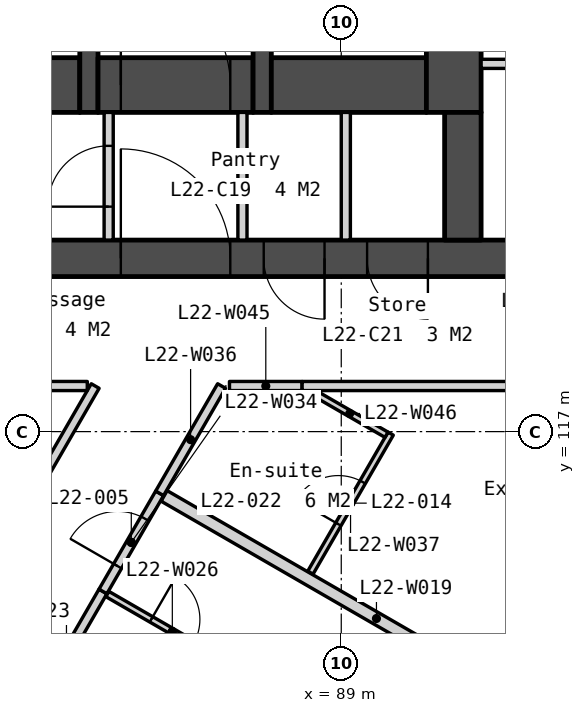
"""IFC4 building model, lengths in metres.
Left out: names, types, materials, properties, quantities, classifications, styles, units other than length and angle.
Written with IfcOpenShell. Run it as: python <this file> out.ifc"""

import sys

from ifc_helpers import new_model, si_unit, direction, frame, frame_2d, origin, place, context, subcontext, project, spatial, polyline, rectangle, outline, extrude, element, fill, save


model = new_model("IFC4")
c1 = context("Model", 3, precision=1e-05, world=origin(), true_north=direction((0.0, 1.0)))
c2 = subcontext(c1, "Body", "Model", "MODEL_VIEW")
j1 = project(units=[si_unit("LENGTHUNIT", "METRE"), si_unit("PLANEANGLEUNIT", "RADIAN")], contexts=[c1])
p1 = place(None, origin())
s1 = spatial("IfcSite", under=j1, at=p1, CompositionType="ELEMENT")
p2 = place(p1, origin())
s2 = spatial("IfcBuilding", under=s1, at=p2, CompositionType="ELEMENT")
p3 = place(p2, frame((0.0, 0.0, 92.3)))
s3 = spatial("IfcBuildingStorey", under=s2, at=p3, CompositionType="ELEMENT", Elevation=92.3)
p4 = place(p3, frame((66.0, 119.85, 0.0), z_axis=(0.0, 0.0, 1.0), x_axis=(1.0, 0.0, 0.0)))
e1 = element("IfcWall", 1, at=p4, inside=s3, PredefinedType="SOLIDWALL", context=c2, shape_type="SweptSolid", body=[
    extrude(rectangle(XDim=28.0, YDim=0.6, at=frame_2d((14.0, 0.0))), origin(), (0.0, 0.0, 1.0), 3.35),
])
p5 = place(p4, frame((6.825, 0.0, 0.0)))
e2 = element("IfcOpeningElement", 2, at=p5, cuts=e1, PredefinedType="OPENING", context=c2, shape_type="SweptSolid", body=[
    extrude(rectangle(XDim=1.8, YDim=2.1, at=frame_2d((0.9, 1.05))), frame((0.0, 0.31, 0.0), z_axis=(0.0, -1.0, 0.0), x_axis=(1.0, 0.0, 0.0)), (0.0, 0.0, 1.0), 0.62),
])
p6 = place(p4, frame((15.85, 0.0, 0.0)))
e3 = element("IfcOpeningElement", 3, at=p6, cuts=e1, PredefinedType="OPENING", context=c2, shape_type="SweptSolid", body=[
    extrude(rectangle(XDim=1.5, YDim=2.1, at=frame_2d((0.75, 1.05))), frame((0.0, 0.31, 0.0), z_axis=(0.0, -1.0, 0.0), x_axis=(1.0, 0.0, 0.0)), (0.0, 0.0, 1.0), 0.62),
])
p7 = place(p4, frame((19.375, 0.0, 0.0)))
e4 = element("IfcOpeningElement", 4, at=p7, cuts=e1, PredefinedType="OPENING", context=c2, shape_type="SweptSolid", body=[
    extrude(rectangle(XDim=1.8, YDim=2.1, at=frame_2d((0.9, 1.05))), frame((0.0, 0.31, 0.0), z_axis=(0.0, -1.0, 0.0), x_axis=(1.0, 0.0, 0.0)), (0.0, 0.0, 1.0), 0.62),
])
p8 = place(p4, frame((4.425, 0.0, 0.0)))
e5 = element("IfcOpeningElement", 5, at=p8, cuts=e1, PredefinedType="OPENING", context=c2, shape_type="SweptSolid", body=[
    extrude(rectangle(XDim=1.0, YDim=2.1, at=frame_2d((0.5, 1.05))), frame((0.0, 0.31, 0.0), z_axis=(0.0, -1.0, 0.0), x_axis=(1.0, 0.0, 0.0)), (0.0, 0.0, 1.0), 0.62),
])
p9 = place(p4, frame((9.925, 0.0, 0.0)))
e6 = element("IfcOpeningElement", 6, at=p9, cuts=e1, PredefinedType="OPENING", context=c2, shape_type="SweptSolid", body=[
    extrude(rectangle(XDim=1.0, YDim=2.1, at=frame_2d((0.5, 1.05))), frame((0.0, 0.31, 0.0), z_axis=(0.0, -1.0, 0.0), x_axis=(1.0, 0.0, 0.0)), (0.0, 0.0, 1.0), 0.62),
])
p10 = place(p4, frame((13.125, 0.0, 0.0)))
e7 = element("IfcOpeningElement", 7, at=p10, cuts=e1, PredefinedType="OPENING", context=c2, shape_type="SweptSolid", body=[
    extrude(rectangle(XDim=1.0, YDim=2.1, at=frame_2d((0.5, 1.05))), frame((0.0, 0.31, 0.0), z_axis=(0.0, -1.0, 0.0), x_axis=(1.0, 0.0, 0.0)), (0.0, 0.0, 1.0), 0.62),
])
p11 = place(p4, frame((21.725, 0.0, 0.0)))
e8 = element("IfcOpeningElement", 8, at=p11, cuts=e1, PredefinedType="OPENING", context=c2, shape_type="SweptSolid", body=[
    extrude(rectangle(XDim=1.0, YDim=2.1, at=frame_2d((0.5, 1.05))), frame((0.0, 0.31, 0.0), z_axis=(0.0, -1.0, 0.0), x_axis=(1.0, 0.0, 0.0)), (0.0, 0.0, 1.0), 0.62),
])
p12 = place(p4, frame((23.425, 0.0, 0.0)))
e9 = element("IfcOpeningElement", 9, at=p12, cuts=e1, PredefinedType="OPENING", context=c2, shape_type="SweptSolid", body=[
    extrude(rectangle(XDim=1.0, YDim=2.1, at=frame_2d((0.5, 1.05))), frame((0.0, 0.31, 0.0), z_axis=(0.0, -1.0, 0.0), x_axis=(1.0, 0.0, 0.0)), (0.0, 0.0, 1.0), 0.62),
])
p13 = place(p3, frame((81.8, 122.7, 0.0), z_axis=(0.0, 0.0, 1.0), x_axis=(1.0, 0.0, 0.0)))
e10 = element("IfcWall", 10, at=p13, inside=s3, PredefinedType="SOLIDWALL", context=c2, shape_type="SweptSolid", body=[
    extrude(rectangle(XDim=2.9, YDim=0.9, at=frame_2d((1.45, 0.0))), origin(), (0.0, 0.0, 1.0), 3.35),
])
p14 = place(p13, frame((0.05, 0.0, 0.0)))
e11 = element("IfcOpeningElement", 11, at=p14, cuts=e10, PredefinedType="OPENING", context=c2, shape_type="SweptSolid", body=[
    extrude(rectangle(XDim=1.5, YDim=2.1, at=frame_2d((0.75, 1.05))), frame((0.0, 0.46, 0.0), z_axis=(0.0, -1.0, 0.0), x_axis=(1.0, 0.0, 0.0)), (0.0, 0.0, 1.0), 0.92),
])
p15 = place(p3, frame((84.85, 133.95, 0.0), z_axis=(0.0, 0.0, 1.0), x_axis=(0.0, -1.0, 0.0)))
e12 = element("IfcWall", 12, at=p15, inside=s3, PredefinedType="SOLIDWALL", context=c2, shape_type="SweptSolid", body=[
    extrude(rectangle(XDim=11.7, YDim=0.3, at=frame_2d((5.85, 0.0))), origin(), (0.0, 0.0, 1.0), 3.35),
])
p16 = place(p3, frame((85.0, 122.7, 0.0), z_axis=(0.0, 0.0, 1.0), x_axis=(1.0, 0.0, 0.0)))
e13 = element("IfcWall", 13, at=p16, inside=s3, PredefinedType="SOLIDWALL", context=c2, shape_type="SweptSolid", body=[
    extrude(rectangle(XDim=2.55, YDim=0.9, at=frame_2d((1.275, 0.0))), origin(), (0.0, 0.0, 1.0), 3.35),
])
p17 = place(p16, frame((0.375, 0.0, 0.0)))
e14 = element("IfcOpeningElement", 14, at=p17, cuts=e13, PredefinedType="OPENING", context=c2, shape_type="SweptSolid", body=[
    extrude(rectangle(XDim=1.8, YDim=2.1, at=frame_2d((0.9, 1.05))), frame((0.0, 0.46, 0.0), z_axis=(0.0, -1.0, 0.0), x_axis=(1.0, 0.0, 0.0)), (0.0, 0.0, 1.0), 0.92),
])
p18 = place(p3, frame((85.175, 122.25, 0.0), z_axis=(0.0, 0.0, 1.0), x_axis=(0.0, -1.0, 0.0)))
e15 = element("IfcWall", 15, at=p18, inside=s3, PredefinedType="PARTITIONING", context=c2, shape_type="SweptSolid", body=[
    extrude(rectangle(XDim=2.1, YDim=0.15, at=frame_2d((1.05, 0.0))), origin(), (0.0, 0.0, 1.0), 3.35),
])
p19 = place(p18, frame((0.55, 0.0, 0.0)))
e16 = element("IfcOpeningElement", 16, at=p19, cuts=e15, PredefinedType="OPENING", context=c2, shape_type="SweptSolid", body=[
    extrude(rectangle(XDim=1.0, YDim=2.1, at=frame_2d((0.5, 1.05))), frame((0.0, 0.085, 0.0), z_axis=(0.0, -1.0, 0.0), x_axis=(1.0, 0.0, 0.0)), (0.0, 0.0, 1.0), 0.17),
])
p20 = place(p3, frame((87.375, 122.25, 0.0), z_axis=(0.0, 0.0, 1.0), x_axis=(0.0, -1.0, 0.0)))
e17 = element("IfcWall", 17, at=p20, inside=s3, PredefinedType="PARTITIONING", context=c2, shape_type="SweptSolid", body=[
    extrude(rectangle(XDim=2.1, YDim=0.15, at=frame_2d((1.05, 0.0))), origin(), (0.0, 0.0, 1.0), 3.35),
])
p21 = place(p3, frame((87.7, 133.95, 0.0), z_axis=(0.0, 0.0, 1.0), x_axis=(0.0, -1.0, 0.0)))
e18 = element("IfcWall", 18, at=p21, inside=s3, PredefinedType="SOLIDWALL", context=c2, shape_type="SweptSolid", body=[
    extrude(rectangle(XDim=11.7, YDim=0.3, at=frame_2d((5.85, 0.0))), origin(), (0.0, 0.0, 1.0), 3.35),
])
p22 = place(p21, frame((6.95, 0.0, 0.0)))
e19 = element("IfcOpeningElement", 19, at=p22, cuts=e18, PredefinedType="OPENING", context=c2, shape_type="SweptSolid", body=[
    extrude(rectangle(XDim=1.1, YDim=2.1, at=frame_2d((0.55, 1.05))), frame((0.0, 0.16, 0.0), z_axis=(0.0, -1.0, 0.0), x_axis=(1.0, 0.0, 0.0)), (0.0, 0.0, 1.0), 0.32),
])
p23 = place(p21, frame((5.1, 0.0, 0.0)))
e20 = element("IfcOpeningElement", 20, at=p23, cuts=e18, PredefinedType="OPENING", context=c2, shape_type="SweptSolid", body=[
    extrude(rectangle(XDim=1.0, YDim=2.1, at=frame_2d((0.5, 1.05))), frame((0.0, 0.16, 0.0), z_axis=(0.0, -1.0, 0.0), x_axis=(1.0, 0.0, 0.0)), (0.0, 0.0, 1.0), 0.32),
])
p24 = place(p21, frame((9.25, 0.0, 0.0)))
e21 = element("IfcOpeningElement", 21, at=p24, cuts=e18, PredefinedType="OPENING", context=c2, shape_type="SweptSolid", body=[
    extrude(rectangle(XDim=1.1, YDim=2.1, at=frame_2d((0.55, 1.05))), frame((0.0, 0.16, 0.0), z_axis=(0.0, -1.0, 0.0), x_axis=(1.0, 0.0, 0.0)), (0.0, 0.0, 1.0), 0.32),
])
p25 = place(p3, frame((87.85, 122.7, 0.0), z_axis=(0.0, 0.0, 1.0), x_axis=(1.0, 0.0, 0.0)))
e22 = element("IfcWall", 22, at=p25, inside=s3, PredefinedType="SOLIDWALL", context=c2, shape_type="SweptSolid", body=[
    extrude(rectangle(XDim=2.55, YDim=0.9, at=frame_2d((1.275, 0.0))), origin(), (0.0, 0.0, 1.0), 3.35),
])
p26 = place(p3, frame((89.075, 122.25, 0.0), z_axis=(0.0, 0.0, 1.0), x_axis=(0.0, -1.0, 0.0)))
e23 = element("IfcWall", 23, at=p26, inside=s3, PredefinedType="PARTITIONING", context=c2, shape_type="SweptSolid", body=[
    extrude(rectangle(XDim=2.1, YDim=0.15, at=frame_2d((1.05, 0.0))), origin(), (0.0, 0.0, 1.0), 3.35),
])
p27 = place(p3, frame((90.85, 133.95, 0.0), z_axis=(0.0, 0.0, 1.0), x_axis=(0.0, -1.0, 0.0)))
e24 = element("IfcWall", 24, at=p27, inside=s3, PredefinedType="SOLIDWALL", context=c2, shape_type="SweptSolid", body=[
    extrude(rectangle(XDim=11.7, YDim=0.9, at=frame_2d((5.85, 0.0))), origin(), (0.0, 0.0, 1.0), 3.35),
])
p28 = place(p3, frame((91.0, 122.25, 0.0), z_axis=(0.0, 0.0, 1.0), x_axis=(0.0, -1.0, 0.0)))
e25 = element("IfcWall", 25, at=p28, inside=s3, PredefinedType="SOLIDWALL", context=c2, shape_type="SweptSolid", body=[
    extrude(rectangle(XDim=2.1, YDim=0.6, at=frame_2d((1.05, 0.0))), origin(), (0.0, 0.0, 1.0), 3.35),
])
p29 = place(p3, frame((91.3, 123.049, 0.0), z_axis=(0.0, 0.0, 1.0), x_axis=(1.0, 0.0, 0.0)))
e26 = element("IfcWall", 26, at=p29, inside=s3, PredefinedType="PARTITIONING", context=c2, shape_type="SweptSolid", body=[
    extrude(rectangle(XDim=2.1, YDim=0.15, at=frame_2d((1.05, 0.0))), origin(), (0.0, 0.0, 1.0), 3.35),
])
p30 = place(p3, frame((82.605, 93.333, -0.15), z_axis=(0.0, 0.0, 1.0), x_axis=(0.500000478905, 0.866025127289, 0.0)))
e27 = element("IfcWall", 27, at=p30, inside=s3, PredefinedType="SOLIDWALL", context=c2, shape_type="SweptSolid", body=[
    extrude(outline(polyline([(42.643, 0.0), (42.643, 3.5), (0.0, 3.5), (0.0, 0.0), (42.643, 0.0)])), frame((0.0, 0.225, 0.0), z_axis=(0.0, -1.0, 0.0), x_axis=(1.0, 0.0, 0.0)), (0.0, 0.0, 1.0), 0.45),
])
p31 = place(p30, frame((2.814, 0.0, 1.05)))
e28 = element("IfcOpeningElement", 28, at=p31, cuts=e27, PredefinedType="OPENING", context=c2, shape_type="SweptSolid", body=[
    extrude(rectangle(XDim=1.2, YDim=1.5, at=frame_2d((0.6, 0.75))), frame((0.0, 0.235, 0.0), z_axis=(0.0, -1.0, 0.0), x_axis=(1.0, 0.0, 0.0)), (0.0, 0.0, 1.0), 0.47),
])
p32 = place(p30, frame((4.514, 0.0, 1.05)))
e29 = element("IfcOpeningElement", 29, at=p32, cuts=e27, PredefinedType="OPENING", context=c2, shape_type="SweptSolid", body=[
    extrude(rectangle(XDim=1.2, YDim=1.5, at=frame_2d((0.6, 0.75))), frame((0.0, 0.235, 0.0), z_axis=(0.0, -1.0, 0.0), x_axis=(1.0, 0.0, 0.0)), (0.0, 0.0, 1.0), 0.47),
])
p33 = place(p30, frame((11.343, 0.0, 1.05)))
e30 = element("IfcOpeningElement", 30, at=p33, cuts=e27, PredefinedType="OPENING", context=c2, shape_type="SweptSolid", body=[
    extrude(rectangle(XDim=1.2, YDim=1.5, at=frame_2d((0.6, 0.75))), frame((0.0, 0.235, 0.0), z_axis=(0.0, -1.0, 0.0), x_axis=(1.0, 0.0, 0.0)), (0.0, 0.0, 1.0), 0.47),
])
p34 = place(p30, frame((13.043, 0.0, 1.05)))
e31 = element("IfcOpeningElement", 31, at=p34, cuts=e27, PredefinedType="OPENING", context=c2, shape_type="SweptSolid", body=[
    extrude(rectangle(XDim=1.2, YDim=1.5, at=frame_2d((0.6, 0.75))), frame((0.0, 0.235, 0.0), z_axis=(0.0, -1.0, 0.0), x_axis=(1.0, 0.0, 0.0)), (0.0, 0.0, 1.0), 0.47),
])
p35 = place(p30, frame((19.872, 0.0, 1.05)))
e32 = element("IfcOpeningElement", 32, at=p35, cuts=e27, PredefinedType="OPENING", context=c2, shape_type="SweptSolid", body=[
    extrude(rectangle(XDim=1.2, YDim=1.5, at=frame_2d((0.6, 0.75))), frame((0.0, 0.235, 0.0), z_axis=(0.0, -1.0, 0.0), x_axis=(1.0, 0.0, 0.0)), (0.0, 0.0, 1.0), 0.47),
])
p36 = place(p30, frame((21.572, 0.0, 1.05)))
e33 = element("IfcOpeningElement", 33, at=p36, cuts=e27, PredefinedType="OPENING", context=c2, shape_type="SweptSolid", body=[
    extrude(rectangle(XDim=1.2, YDim=1.5, at=frame_2d((0.6, 0.75))), frame((0.0, 0.235, 0.0), z_axis=(0.0, -1.0, 0.0), x_axis=(1.0, 0.0, 0.0)), (0.0, 0.0, 1.0), 0.47),
])
p37 = place(p30, frame((28.4, 0.0, 1.05)))
e34 = element("IfcOpeningElement", 34, at=p37, cuts=e27, PredefinedType="OPENING", context=c2, shape_type="SweptSolid", body=[
    extrude(rectangle(XDim=1.2, YDim=1.5, at=frame_2d((0.6, 0.75))), frame((0.0, 0.235, 0.0), z_axis=(0.0, -1.0, 0.0), x_axis=(1.0, 0.0, 0.0)), (0.0, 0.0, 1.0), 0.47),
])
p38 = place(p30, frame((30.1, 0.0, 1.05)))
e35 = element("IfcOpeningElement", 35, at=p38, cuts=e27, PredefinedType="OPENING", context=c2, shape_type="SweptSolid", body=[
    extrude(rectangle(XDim=1.2, YDim=1.5, at=frame_2d((0.6, 0.75))), frame((0.0, 0.235, 0.0), z_axis=(0.0, -1.0, 0.0), x_axis=(1.0, 0.0, 0.0)), (0.0, 0.0, 1.0), 0.47),
])
p39 = place(p30, frame((36.929, 0.0, 1.05)))
e36 = element("IfcOpeningElement", 36, at=p39, cuts=e27, PredefinedType="OPENING", context=c2, shape_type="SweptSolid", body=[
    extrude(rectangle(XDim=1.2, YDim=1.5, at=frame_2d((0.6, 0.75))), frame((0.0, 0.235, 0.0), z_axis=(0.0, -1.0, 0.0), x_axis=(1.0, 0.0, 0.0)), (0.0, 0.0, 1.0), 0.47),
])
p40 = place(p30, frame((38.629, 0.0, 1.05)))
e37 = element("IfcOpeningElement", 37, at=p40, cuts=e27, PredefinedType="OPENING", context=c2, shape_type="SweptSolid", body=[
    extrude(rectangle(XDim=1.2, YDim=1.5, at=frame_2d((0.6, 0.75))), frame((0.0, 0.235, 0.0), z_axis=(0.0, -1.0, 0.0), x_axis=(1.0, 0.0, 0.0)), (0.0, 0.0, 1.0), 0.47),
])
p41 = place(p3, frame((80.0, 109.17, 0.0), z_axis=(0.0, 0.0, 1.0), x_axis=(0.499995505729, 0.866027998537, 0.0)))
e38 = element("IfcWall", 38, at=p41, inside=s3, PredefinedType="PARTITIONING", context=c2, shape_type="SweptSolid", body=[
    extrude(rectangle(XDim=9.907, YDim=0.15, at=frame_2d((4.953, 0.0))), origin(), (0.0, 0.0, 1.0), 3.35),
])
p42 = place(p41, frame((4.053, 0.0, 0.0)))
e39 = element("IfcOpeningElement", 39, at=p42, cuts=e38, PredefinedType="OPENING", context=c2, shape_type="SweptSolid", body=[
    extrude(rectangle(XDim=1.8, YDim=2.1, at=frame_2d((0.9, 1.05))), frame((0.0, 0.085, 0.0), z_axis=(0.0, -1.0, 0.0), x_axis=(1.0, 0.0, 0.0)), (0.0, 0.0, 1.0), 0.17),
])
p43 = place(p3, frame((86.087, 115.943, 0.0), z_axis=(0.0, 0.0, 1.0), x_axis=(0.866010152247, -0.500026415507, 0.0)))
e40 = element("IfcWall", 40, at=p43, inside=s3, PredefinedType="PARTITIONING", context=c2, shape_type="SweptSolid", body=[
    extrude(rectangle(XDim=8.065, YDim=0.2, at=frame_2d((4.032, 0.0))), origin(), (0.0, 0.0, 1.0), 3.35),
])
p44 = place(p3, frame((83.881, 112.292, 0.0), z_axis=(0.0, 0.0, 1.0), x_axis=(0.500001309137, 0.866024647952, 0.0)))
e41 = element("IfcWall", 41, at=p44, inside=s3, PredefinedType="PARTITIONING", context=c2, shape_type="SweptSolid", body=[
    extrude(rectangle(XDim=2.4, YDim=0.15, at=frame_2d((1.2, 0.0))), origin(), (0.0, 0.0, 1.0), 3.35),
])
p45 = place(p3, frame((85.154, 114.328, 0.0), z_axis=(0.0, 0.0, 1.0), x_axis=(0.866040446274, -0.499973944738, 0.0)))
e42 = element("IfcWall", 42, at=p45, inside=s3, PredefinedType="PARTITIONING", context=c2, shape_type="SweptSolid", body=[
    extrude(rectangle(XDim=2.465, YDim=0.1, at=frame_2d((1.232, 0.0))), origin(), (0.0, 0.0, 1.0), 3.35),
])
p46 = place(p45, frame((0.833, 0.0, 0.0)))
e43 = element("IfcOpeningElement", 43, at=p46, cuts=e42, PredefinedType="OPENING", context=c2, shape_type="SweptSolid", body=[
    extrude(rectangle(XDim=0.8, YDim=2.1, at=frame_2d((0.4, 1.05))), frame((0.0, 0.06, 0.0), z_axis=(0.0, -1.0, 0.0), x_axis=(1.0, 0.0, 0.0)), (0.0, 0.0, 1.0), 0.12),
])
p47 = place(p3, frame((85.081, 114.371, 0.0), z_axis=(0.0, 0.0, 1.0), x_axis=(0.499941596792, 0.866059120267, 0.0)))
e44 = element("IfcWall", 44, at=p47, inside=s3, PredefinedType="PARTITIONING", context=c2, shape_type="SweptSolid", body=[
    extrude(rectangle(XDim=1.865, YDim=0.15, at=frame_2d((0.932, 0.0))), origin(), (0.0, 0.0, 1.0), 3.35),
])
p48 = place(p47, frame((0.482, 0.0, 0.0)))
e45 = element("IfcOpeningElement", 45, at=p48, cuts=e44, PredefinedType="OPENING", context=c2, shape_type="SweptSolid", body=[
    extrude(rectangle(XDim=0.9, YDim=2.1, at=frame_2d((0.45, 1.05))), frame((0.0, 0.085, 0.0), z_axis=(0.0, -1.0, 0.0), x_axis=(1.0, 0.0, 0.0)), (0.0, 0.0, 1.0), 0.17),
])
p49 = place(p3, frame((86.013, 115.985, 0.0), z_axis=(0.0, 0.0, 1.0), x_axis=(0.499992114976, 0.866029956157, 0.0)))
e46 = element("IfcWall", 46, at=p49, inside=s3, PredefinedType="PARTITIONING", context=c2, shape_type="SweptSolid", body=[
    extrude(rectangle(XDim=2.038, YDim=0.15, at=frame_2d((1.019, 0.0))), origin(), (0.0, 0.0, 1.0), 3.35),
])
p50 = place(p3, frame((88.493, 114.68, 0.0), z_axis=(0.0, 0.0, 1.0), x_axis=(0.499938597367, 0.866060851709, 0.0)))
e47 = element("IfcWall", 47, at=p50, inside=s3, PredefinedType="PARTITIONING", context=c2, shape_type="SweptSolid", body=[
    extrude(rectangle(XDim=2.64, YDim=0.1, at=frame_2d((1.32, 0.0))), origin(), (0.0, 0.0, 1.0), 3.35),
])
p51 = place(p50, frame((0.92, 0.0, 0.0)))
e48 = element("IfcOpeningElement", 48, at=p51, cuts=e47, PredefinedType="OPENING", context=c2, shape_type="SweptSolid", body=[
    extrude(rectangle(XDim=0.8, YDim=2.1, at=frame_2d((0.4, 1.05))), frame((0.0, 0.06, 0.0), z_axis=(0.0, -1.0, 0.0), x_axis=(1.0, 0.0, 0.0)), (0.0, 0.0, 1.0), 0.12),
])
p52 = place(p3, frame((75.177, 117.75, 0.0), z_axis=(0.0, 0.0, 1.0), x_axis=(1.0, 0.0, 0.0)))
e49 = element("IfcWall", 49, at=p52, inside=s3, PredefinedType="PARTITIONING", context=c2, shape_type="SweptSolid", body=[
    extrude(rectangle(XDim=9.647, YDim=0.15, at=frame_2d((4.823, 0.0))), origin(), (0.0, 0.0, 1.0), 3.35),
])
p53 = place(p3, frame((87.162, 117.75, 0.0), z_axis=(0.0, 0.0, 1.0), x_axis=(1.0, 0.0, 0.0)))
e50 = element("IfcWall", 50, at=p53, inside=s3, PredefinedType="PARTITIONING", context=c2, shape_type="SweptSolid", body=[
    extrude(rectangle(XDim=1.195, YDim=0.15, at=frame_2d((0.597, 0.0))), origin(), (0.0, 0.0, 1.0), 3.35),
])
p54 = place(p3, frame((88.534, 117.647, 0.0), z_axis=(0.0, 0.0, 1.0), x_axis=(0.866031452229, -0.49998952364, 0.0)))
e51 = element("IfcWall", 51, at=p54, inside=s3, PredefinedType="PARTITIONING", context=c2, shape_type="SweptSolid", body=[
    extrude(rectangle(XDim=1.398, YDim=0.1, at=frame_2d((0.699, 0.0))), origin(), (0.0, 0.0, 1.0), 3.35),
])
p55 = place(p3, frame((88.356, 117.75, 0.0), z_axis=(0.0, 0.0, 1.0), x_axis=(1.0, 0.0, 0.0)))
e52 = element("IfcWall", 52, at=p55, inside=s3, PredefinedType="PARTITIONING", context=c2, shape_type="SweptSolid", body=[
    extrude(rectangle(XDim=8.075, YDim=0.15, at=frame_2d((4.037, 0.0))), origin(), (0.0, 0.0, 1.0), 3.35),
])
p56 = place(p55, frame((3.537, 0.0, 0.0)))
e53 = element("IfcOpeningElement", 53, at=p56, cuts=e52, PredefinedType="OPENING", context=c2, shape_type="SweptSolid", body=[
    extrude(rectangle(XDim=1.0, YDim=2.1, at=frame_2d((0.5, 1.05))), frame((0.0, 0.085, 0.0), z_axis=(0.0, -1.0, 0.0), x_axis=(1.0, 0.0, 0.0)), (0.0, 0.0, 1.0), 0.17),
])
p57 = place(p17, origin())
e54 = element("IfcDoor", 54, at=p57, inside=s3, OperationType="DOUBLE_DOOR_DOUBLE_SWING", PredefinedType="DOOR", context=c2, shape_type="SweptSolid", body=[
    extrude(rectangle(XDim=1.8, YDim=2.1, at=frame_2d((0.9, 1.05))), frame((0.0, 0.025, 0.0), z_axis=(0.0, -1.0, 0.0), x_axis=(1.0, 0.0, 0.0)), (0.0, 0.0, 1.0), 0.05),
])
fill(e14, e54)
p58 = place(p7, origin())
e55 = element("IfcDoor", 55, at=p58, inside=s3, OperationType="DOUBLE_DOOR_DOUBLE_SWING", PredefinedType="DOOR", context=c2, shape_type="SweptSolid", body=[
    extrude(rectangle(XDim=1.8, YDim=2.1, at=frame_2d((0.9, 1.05))), frame((0.0, 0.025, 0.0), z_axis=(0.0, -1.0, 0.0), x_axis=(1.0, 0.0, 0.0)), (0.0, 0.0, 1.0), 0.05),
])
fill(e4, e55)
p59 = place(p19, origin())
e56 = element("IfcDoor", 56, at=p59, inside=s3, OperationType="SINGLE_SWING_RIGHT", PredefinedType="DOOR", context=c2, shape_type="SweptSolid", body=[
    extrude(rectangle(XDim=1.0, YDim=2.1, at=frame_2d((0.5, 1.05))), frame((0.0, 0.025, 0.0), z_axis=(0.0, -1.0, 0.0), x_axis=(1.0, 0.0, 0.0)), (0.0, 0.0, 1.0), 0.05),
])
fill(e16, e56)
p60 = place(p11, origin())
e57 = element("IfcDoor", 57, at=p60, inside=s3, OperationType="SINGLE_SWING_RIGHT", PredefinedType="DOOR", context=c2, shape_type="SweptSolid", body=[
    extrude(rectangle(XDim=1.0, YDim=2.1, at=frame_2d((0.5, 1.05))), frame((0.0, 0.025, 0.0), z_axis=(0.0, -1.0, 0.0), x_axis=(1.0, 0.0, 0.0)), (0.0, 0.0, 1.0), 0.05),
])
fill(e8, e57)
p61 = place(p12, origin())
e58 = element("IfcDoor", 58, at=p61, inside=s3, OperationType="SINGLE_SWING_RIGHT", PredefinedType="DOOR", context=c2, shape_type="SweptSolid", body=[
    extrude(rectangle(XDim=1.0, YDim=2.1, at=frame_2d((0.5, 1.05))), frame((0.0, 0.025, 0.0), z_axis=(0.0, -1.0, 0.0), x_axis=(1.0, 0.0, 0.0)), (0.0, 0.0, 1.0), 0.05),
])
fill(e9, e58)
p62 = place(p48, origin())
e59 = element("IfcDoor", 59, at=p62, inside=s3, OperationType="SINGLE_SWING_LEFT", PredefinedType="DOOR", context=c2, shape_type="SweptSolid", body=[
    extrude(rectangle(XDim=0.9, YDim=2.1, at=frame_2d((0.45, 1.05))), frame((0.0, 0.025, 0.0), z_axis=(0.0, -1.0, 0.0), x_axis=(1.0, 0.0, 0.0)), (0.0, 0.0, 1.0), 0.05),
])
fill(e45, e59)
p63 = place(p46, origin())
e60 = element("IfcDoor", 60, at=p63, inside=s3, OperationType="SINGLE_SWING_LEFT", PredefinedType="DOOR", context=c2, shape_type="SweptSolid", body=[
    extrude(rectangle(XDim=0.8, YDim=2.1, at=frame_2d((0.4, 1.05))), frame((0.0, 0.025, 0.0), z_axis=(0.0, -1.0, 0.0), x_axis=(1.0, 0.0, 0.0)), (0.0, 0.0, 1.0), 0.05),
])
fill(e43, e60)
p64 = place(p51, origin())
e61 = element("IfcDoor", 61, at=p64, inside=s3, OperationType="SINGLE_SWING_LEFT", PredefinedType="DOOR", context=c2, shape_type="SweptSolid", body=[
    extrude(rectangle(XDim=0.8, YDim=2.1, at=frame_2d((0.4, 1.05))), frame((0.0, 0.025, 0.0), z_axis=(0.0, -1.0, 0.0), x_axis=(1.0, 0.0, 0.0)), (0.0, 0.0, 1.0), 0.05),
])
fill(e48, e61)
save(model, sys.argv[1])
